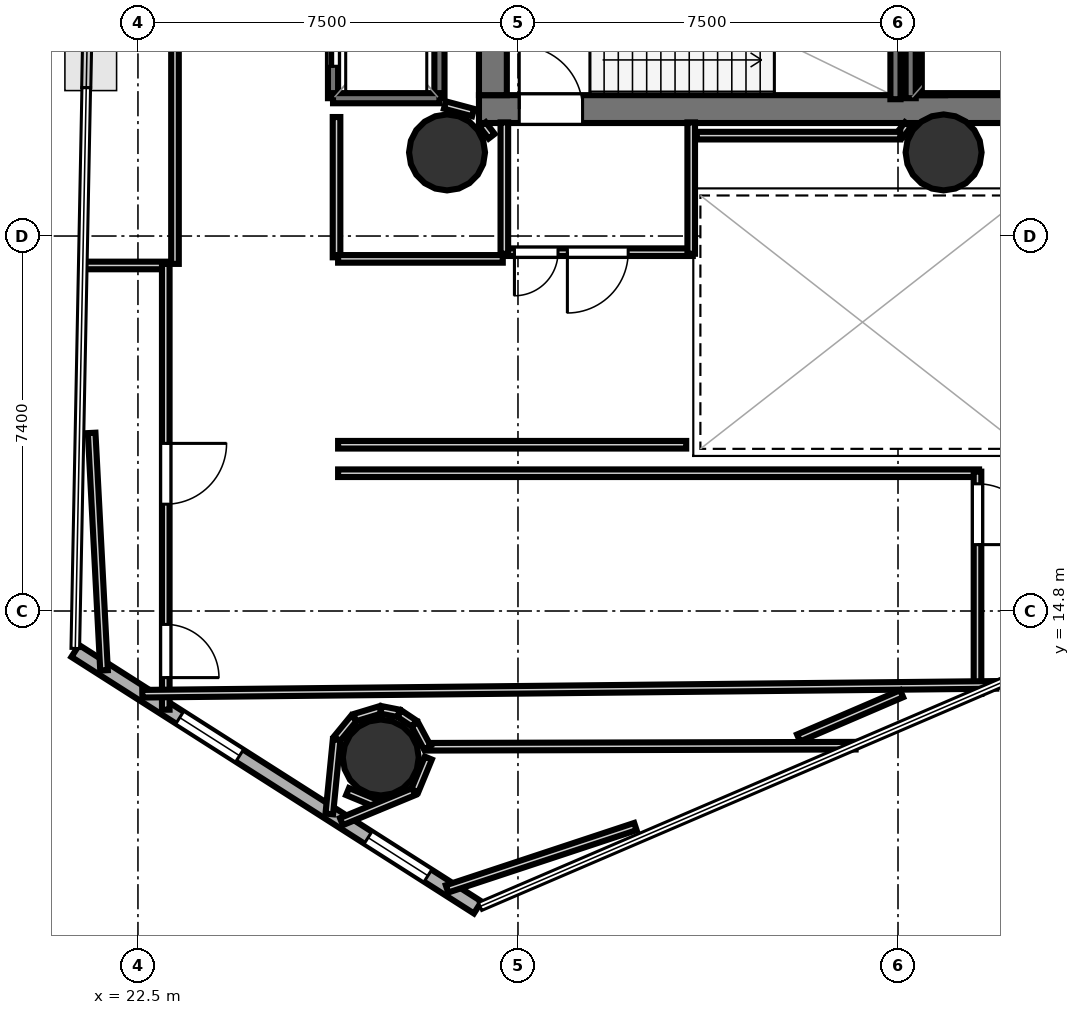
"""IFC4 building model, lengths in metres.
Left out: names, types, materials, properties, quantities, classifications, styles, units other than length and angle.
Written with IfcOpenShell. Run it as: python <this file> out.ifc"""

import sys

from ifc_helpers import new_model, si_unit, direction, frame, frame_2d, origin, origin_2d, place, context, subcontext, project, spatial, rectangle, hollow_circle, extrude, element, fill, save


model = new_model("IFC4")
c1 = context("Model", 3, precision=1e-05, world=origin(), true_north=direction((0.0, 1.0)))
c2 = subcontext(c1, "Body", "Model", "MODEL_VIEW")
j1 = project(units=[si_unit("LENGTHUNIT", "METRE"), si_unit("PLANEANGLEUNIT", "RADIAN")], contexts=[c1])
p1 = place(None, origin())
s1 = spatial("IfcSite", under=j1, at=p1, CompositionType="ELEMENT")
p2 = place(p1, origin())
s2 = spatial("IfcBuilding", under=s1, at=p2, CompositionType="ELEMENT")
p3 = place(p2, frame((0.0, 0.0, 138.5)))
s3 = spatial("IfcBuildingStorey", under=s2, at=p3, CompositionType="ELEMENT", Elevation=138.5)
p4 = place(p3, frame((29.23, 24.705, 0.0), z_axis=(0.0, 0.0, 1.0), x_axis=(1.0, 0.0, 0.0)))
e1 = element("IfcWall", 1, at=p4, inside=s3, PredefinedType="SHEAR", context=c2, shape_type="SweptSolid", body=[
    extrude(rectangle(XDim=10.62, YDim=0.55, at=frame_2d((5.31, 0.0))), origin(), (0.0, 0.0, 1.0), 4.38),
])
p5 = place(p4, frame((0.795, 0.0, 0.0)))
e2 = element("IfcOpeningElement", 2, at=p5, cuts=e1, PredefinedType="OPENING", context=c2, shape_type="SweptSolid", body=[
    extrude(rectangle(XDim=1.25, YDim=2.15, at=frame_2d((0.625, 1.075))), frame((0.0, 0.285, 0.0), z_axis=(0.0, -1.0, 0.0), x_axis=(1.0, 0.0, 0.0)), (0.0, 0.0, 1.0), 0.57),
])
p6 = place(p3, frame((29.505, 24.98, 0.0), z_axis=(0.0, 0.0, 1.0), x_axis=(0.0, 1.0, 0.0)))
e3 = element("IfcWall", 3, at=p6, inside=s3, PredefinedType="SHEAR", context=c2, shape_type="SweptSolid", body=[
    extrude(rectangle(XDim=7.44, YDim=0.55, at=frame_2d((3.72, 0.0))), origin(), (0.0, 0.0, 1.0), 4.38),
])
p7 = place(p3, frame((38.18, 24.98, 0.0), z_axis=(0.0, 0.0, 1.0), x_axis=(0.0, 1.0, 0.0)))
e4 = element("IfcWall", 4, at=p7, inside=s3, PredefinedType="SHEAR", context=c2, shape_type="SweptSolid", body=[
    extrude(rectangle(XDim=7.44, YDim=0.5, at=frame_2d((3.72, 0.0))), origin(), (0.0, 0.0, 1.0), 4.38),
])
for number, where, z_axis, x_axis in (
    (5, (28.6, 23.85, 0.0), (0.0, 0.0, 1.0), (1.0, 0.0, 0.0)),
    (6, (38.4, 23.85, 0.0), (0.0, 0.0, 1.0), (1.0, 0.0, 0.0)),
    (7, (27.292, 11.909, 0.0), (0.0, 0.0, 1.0), (1.0, 0.0, 0.0)),
):
    element("IfcColumn", number, at=place(p3, frame(where, z_axis=z_axis, x_axis=x_axis)), inside=s3, PredefinedType="COLUMN", context=c2, shape_type="SweptSolid", body=[
        extrude(hollow_circle(Radius=0.75, WallThickness=0.036, at=origin_2d()), origin(), (0.0, 0.0, 1.0), 4.6),
    ])
p8 = place(p3, frame((21.262, 14.011, 0.0), z_axis=(0.0, 0.0, 1.0), x_axis=(0.843341146408, -0.537378554442, 0.0)))
e8 = element("IfcWall", 8, at=p8, inside=s3, PredefinedType="SOLIDWALL", context=c2, shape_type="SweptSolid", body=[
    extrude(rectangle(XDim=9.419, YDim=0.28, at=frame_2d((4.709, 0.0))), origin(), (0.0, 0.0, 1.0), 4.38),
])
p9 = place(p8, frame((2.446, 0.0, 1.0)))
e9 = element("IfcOpeningElement", 9, at=p9, cuts=e8, PredefinedType="OPENING", context=c2, shape_type="SweptSolid", body=[
    extrude(rectangle(XDim=1.4, YDim=1.5, at=frame_2d((0.7, 0.75))), frame((0.0, 0.15, 0.0), z_axis=(0.0, -1.0, 0.0), x_axis=(1.0, 0.0, 0.0)), (0.0, 0.0, 1.0), 0.3),
])
p10 = place(p8, frame((6.853, 0.0, 1.0)))
e10 = element("IfcOpeningElement", 10, at=p10, cuts=e8, PredefinedType="OPENING", context=c2, shape_type="SweptSolid", body=[
    extrude(rectangle(XDim=1.4, YDim=1.5, at=frame_2d((0.7, 0.75))), frame((0.0, 0.15, 0.0), z_axis=(0.0, -1.0, 0.0), x_axis=(1.0, 0.0, 0.0)), (0.0, 0.0, 1.0), 0.3),
])
p11 = place(p3, frame((37.45, 24.9, 0.0), z_axis=(0.0, 0.0, 1.0), x_axis=(0.0, 1.0, 0.0)))
e11 = element("IfcWall", 11, at=p11, inside=s3, PredefinedType="SOLIDWALL", context=c2, shape_type="SweptSolid", body=[
    extrude(rectangle(XDim=3.06, YDim=0.2, at=frame_2d((1.53, 0.0))), origin(), (0.0, 0.0, 1.0), 4.38),
])
for number, where, z_axis, x_axis in (
    (12, (37.75, 24.92, 0.0), (0.0, 0.0, 1.0), (0.0, 1.0, 0.0)),
    (13, (28.45, 24.92, 0.0), (0.0, 0.0, 1.0), (0.0, 1.0, 0.0)),
):
    element("IfcWall", number, at=place(p3, frame(where, z_axis=z_axis, x_axis=x_axis)), inside=s3, PredefinedType="SOLIDWALL", context=c2, shape_type="SweptSolid", body=[
        extrude(rectangle(XDim=2.36, YDim=0.2, at=frame_2d((1.18, 0.0))), origin(), (0.0, 0.0, 1.0), 4.38),
    ])
p12 = place(p3, frame((26.35, 24.92, 0.0), z_axis=(0.0, 0.0, 1.0), x_axis=(0.0, 1.0, 0.0)))
e14 = element("IfcWall", 14, at=p12, inside=s3, PredefinedType="SOLIDWALL", context=c2, shape_type="SweptSolid", body=[
    extrude(rectangle(XDim=2.36, YDim=0.2, at=frame_2d((1.18, 0.0))), origin(), (0.0, 0.0, 1.0), 4.38),
])
p13 = place(p12, frame((0.63, 0.0, 0.0)))
e15 = element("IfcOpeningElement", 15, at=p13, cuts=e14, PredefinedType="OPENING", context=c2, shape_type="SweptSolid", body=[
    extrude(rectangle(XDim=1.1, YDim=2.15, at=frame_2d((0.55, 1.075))), frame((0.0, 0.11, 0.0), z_axis=(0.0, -1.0, 0.0), x_axis=(1.0, 0.0, 0.0)), (0.0, 0.0, 1.0), 0.22),
])
p14 = place(p3, frame((26.35, 24.92, 0.0), z_axis=(0.0, 0.0, 1.0), x_axis=(1.0, 0.0, 0.0)))
e16 = element("IfcWall", 16, at=p14, inside=s3, PredefinedType="SOLIDWALL", context=c2, shape_type="SweptSolid", body=[
    extrude(rectangle(XDim=2.1, YDim=0.2, at=frame_2d((1.05, 0.0))), origin(), (0.0, 0.0, 1.0), 4.38),
])
p15 = place(p3, frame((33.45, 21.881, 0.0), z_axis=(0.0, 0.0, 1.0), x_axis=(-1.0, 0.0, 0.0)))
e17 = element("IfcWall", 17, at=p15, inside=s3, PredefinedType="PARTITIONING", context=c2, shape_type="SweptSolid", body=[
    extrude(rectangle(XDim=3.75, YDim=0.15, at=frame_2d((1.875, 0.0))), origin(), (0.0, 0.0, 1.0), 2.9),
])
p16 = place(p15, frame((1.275, 0.0, 0.0)))
e18 = element("IfcOpeningElement", 18, at=p16, cuts=e17, PredefinedType="OPENING", context=c2, shape_type="SweptSolid", body=[
    extrude(rectangle(XDim=1.2, YDim=2.15, at=frame_2d((0.6, 1.075))), frame((0.0, 0.085, 0.0), z_axis=(0.0, -1.0, 0.0), x_axis=(1.0, 0.0, 0.0)), (0.0, 0.0, 1.0), 0.17),
])
p17 = place(p15, frame((2.66, 0.0, 0.0)))
e19 = element("IfcOpeningElement", 19, at=p17, cuts=e17, PredefinedType="OPENING", context=c2, shape_type="SweptSolid", body=[
    extrude(rectangle(XDim=0.86, YDim=2.05, at=frame_2d((0.43, 1.025))), frame((0.0, 0.085, 0.0), z_axis=(0.0, -1.0, 0.0), x_axis=(1.0, 0.0, 0.0)), (0.0, 0.0, 1.0), 0.17),
])
for number, where, z_axis, x_axis in (
    (20, (29.731, 21.85, 0.0), (0.0, 0.0, 1.0), (0.0, 1.0, 0.0)),
    (21, (33.419, 24.442, 0.0), (0.0, 0.0, 1.0), (0.0, -1.0, 0.0)),
):
    element("IfcWall", number, at=place(p3, frame(where, z_axis=z_axis, x_axis=x_axis)), inside=s3, PredefinedType="PARTITIONING", context=c2, shape_type="SweptSolid", body=[
        extrude(rectangle(XDim=2.592, YDim=0.15, at=frame_2d((1.296, 0.0))), origin(), (0.0, 0.0, 1.0), 2.9),
    ])
p18 = place(p3, frame((29.48, 24.169, 0.0), z_axis=(0.0, 0.0, 1.0), x_axis=(-0.608043045279, 0.79390405912, 0.0)))
e22 = element("IfcWall", 22, at=p18, inside=s3, PredefinedType="PARTITIONING", context=c2, shape_type="SweptSolid", body=[
    extrude(rectangle(XDim=0.29, YDim=0.15, at=frame_2d((0.145, 0.0))), origin(), (0.0, 0.0, 1.0), 2.9),
])
p19 = place(p3, frame((29.114, 24.637, 0.0), z_axis=(0.0, 0.0, 1.0), x_axis=(-0.966199685486, 0.257794817183, 0.0)))
e23 = element("IfcWall", 23, at=p19, inside=s3, PredefinedType="PARTITIONING", context=c2, shape_type="SweptSolid", body=[
    extrude(rectangle(XDim=0.575, YDim=0.15, at=frame_2d((0.288, 0.0))), origin(), (0.0, 0.0, 1.0), 2.9),
])
p20 = place(p3, frame((37.697, 24.399, 0.0), z_axis=(0.0, 0.0, 1.0), x_axis=(-0.60763139403, -0.794219169367, 0.0)))
e24 = element("IfcWall", 24, at=p20, inside=s3, PredefinedType="PARTITIONING", context=c2, shape_type="SweptSolid", body=[
    extrude(rectangle(XDim=0.25, YDim=0.15, at=frame_2d((0.125, 0.0))), origin(), (0.0, 0.0, 1.0), 2.9),
])
p21 = place(p3, frame((37.545, 24.181, 0.0), z_axis=(0.0, 0.0, 1.0), x_axis=(-1.0, 0.0, 0.0)))
e25 = element("IfcWall", 25, at=p21, inside=s3, PredefinedType="PARTITIONING", context=c2, shape_type="SweptSolid", body=[
    extrude(rectangle(XDim=4.015, YDim=0.15, at=frame_2d((2.007, 0.0))), origin(), (0.0, 0.0, 1.0), 2.9),
])
p22 = place(p3, frame((21.831, 13.628, 0.0), z_axis=(0.0, 0.0, 1.0), x_axis=(-0.052078231373, 0.998643008195, 0.0)))
e26 = element("IfcWall", 26, at=p22, inside=s3, PredefinedType="PARTITIONING", context=c2, shape_type="SweptSolid", body=[
    extrude(rectangle(XDim=4.693, YDim=0.15, at=frame_2d((2.346, 0.0))), origin(), (0.0, 0.0, 1.0), 2.9),
])
p23 = place(p3, frame((21.391, 21.619, 0.0), z_axis=(0.0, 0.0, 1.0), x_axis=(1.0, 0.0, 0.0)))
e27 = element("IfcWall", 27, at=p23, inside=s3, PredefinedType="PARTITIONING", context=c2, shape_type="SweptSolid", body=[
    extrude(rectangle(XDim=1.689, YDim=0.15, at=frame_2d((0.845, 0.0))), origin(), (0.0, 0.0, 1.0), 2.9),
])
p24 = place(p3, frame((23.049, 21.65, 0.0), z_axis=(0.0, 0.0, 1.0), x_axis=(0.0, -1.0, 0.0)))
e28 = element("IfcWall", 28, at=p24, inside=s3, PredefinedType="PARTITIONING", context=c2, shape_type="SweptSolid", body=[
    extrude(rectangle(XDim=8.797, YDim=0.15, at=frame_2d((4.399, 0.0))), origin(), (0.0, 0.0, 1.0), 2.9),
])
p25 = place(p24, frame((3.542, 0.0, 0.0)))
e29 = element("IfcOpeningElement", 29, at=p25, cuts=e28, PredefinedType="OPENING", context=c2, shape_type="SweptSolid", body=[
    extrude(rectangle(XDim=1.2, YDim=2.15, at=frame_2d((0.6, 1.075))), frame((0.0, 0.085, 0.0), z_axis=(0.0, -1.0, 0.0), x_axis=(1.0, 0.0, 0.0)), (0.0, 0.0, 1.0), 0.17),
])
p26 = place(p24, frame((7.114, 0.0, 0.0)))
e30 = element("IfcOpeningElement", 30, at=p26, cuts=e28, PredefinedType="OPENING", context=c2, shape_type="SweptSolid", body=[
    extrude(rectangle(XDim=1.05, YDim=2.15, at=frame_2d((0.525, 1.075))), frame((0.0, 0.085, 0.0), z_axis=(0.0, -1.0, 0.0), x_axis=(1.0, 0.0, 0.0)), (0.0, 0.0, 1.0), 0.17),
])
p27 = place(p3, frame((26.419, 24.548, 0.0), z_axis=(0.0, 0.0, 1.0), x_axis=(0.0, -1.0, 0.0)))
e31 = element("IfcWall", 31, at=p27, inside=s3, PredefinedType="PARTITIONING", context=c2, shape_type="SweptSolid", body=[
    extrude(rectangle(XDim=2.768, YDim=0.15, at=frame_2d((1.384, 0.0))), origin(), (0.0, 0.0, 1.0), 2.9),
])
p28 = place(p3, frame((26.45, 21.749, 0.0), z_axis=(0.0, 0.0, 1.0), x_axis=(1.0, 0.0, 0.0)))
e32 = element("IfcWall", 32, at=p28, inside=s3, PredefinedType="PARTITIONING", context=c2, shape_type="SweptSolid", body=[
    extrude(rectangle(XDim=3.25, YDim=0.15, at=frame_2d((1.625, 0.0))), origin(), (0.0, 0.0, 1.0), 2.9),
])
p29 = place(p3, frame((33.32, 18.081, 0.0), z_axis=(0.0, 0.0, 1.0), x_axis=(-1.0, 0.0, 0.0)))
e33 = element("IfcWall", 33, at=p29, inside=s3, PredefinedType="PARTITIONING", context=c2, shape_type="SweptSolid", body=[
    extrude(rectangle(XDim=6.87, YDim=0.15, at=frame_2d((3.435, 0.0))), origin(), (0.0, 0.0, 1.0), 2.9),
])
p30 = place(p3, frame((26.45, 17.519, 0.0), z_axis=(0.0, 0.0, 1.0), x_axis=(1.0, 0.0, 0.0)))
e34 = element("IfcWall", 34, at=p30, inside=s3, PredefinedType="PARTITIONING", context=c2, shape_type="SweptSolid", body=[
    extrude(rectangle(XDim=12.65, YDim=0.15, at=frame_2d((6.325, 0.0))), origin(), (0.0, 0.0, 1.0), 2.9),
])
p31 = place(p3, frame((39.069, 17.55, 0.0), z_axis=(0.0, 0.0, 1.0), x_axis=(0.0, -1.0, 0.0)))
e35 = element("IfcWall", 35, at=p31, inside=s3, PredefinedType="PARTITIONING", context=c2, shape_type="SweptSolid", body=[
    extrude(rectangle(XDim=4.386, YDim=0.15, at=frame_2d((2.193, 0.0))), origin(), (0.0, 0.0, 1.0), 2.9),
])
p32 = place(p31, frame((0.24, 0.0, 0.0)))
e36 = element("IfcOpeningElement", 36, at=p32, cuts=e35, PredefinedType="OPENING", context=c2, shape_type="SweptSolid", body=[
    extrude(rectangle(XDim=1.2, YDim=2.15, at=frame_2d((0.6, 1.075))), frame((0.0, 0.085, 0.0), z_axis=(0.0, -1.0, 0.0), x_axis=(1.0, 0.0, 0.0)), (0.0, 0.0, 1.0), 0.17),
])
p33 = place(p3, frame((39.439, 13.342, 0.0), z_axis=(0.0, 0.0, 1.0), x_axis=(-0.999946210458, -0.010371894228, 0.0)))
e37 = element("IfcWall", 37, at=p33, inside=s3, PredefinedType="PARTITIONING", context=c2, shape_type="SweptSolid", body=[
    extrude(rectangle(XDim=16.854, YDim=0.15, at=frame_2d((8.427, 0.0))), origin(), (0.0, 0.0, 1.0), 2.9),
])
p34 = place(p3, frame((23.231, 21.65, 0.0), z_axis=(0.0, 0.0, 1.0), x_axis=(0.0, 1.0, 0.0)))
e38 = element("IfcWall", 38, at=p34, inside=s3, PredefinedType="PARTITIONING", context=c2, shape_type="SweptSolid", body=[
    extrude(rectangle(XDim=4.882, YDim=0.15, at=frame_2d((2.441, 0.0))), origin(), (0.0, 0.0, 1.0), 2.9),
])
p35 = place(p3, frame((37.572, 13.168, 0.0), z_axis=(0.0, 0.0, 1.0), x_axis=(-0.918911067861, -0.394464763144, 0.0)))
e39 = element("IfcWall", 39, at=p35, inside=s3, PredefinedType="PARTITIONING", context=c2, shape_type="SweptSolid", body=[
    extrude(rectangle(XDim=2.215, YDim=0.15, at=frame_2d((1.107, 0.0))), origin(), (0.0, 0.0, 1.0), 2.9),
])
p36 = place(p3, frame((36.663, 12.142, 0.0), z_axis=(0.0, 0.0, 1.0), x_axis=(-0.999996934648, -0.00247602385, 0.0)))
e40 = element("IfcWall", 40, at=p36, inside=s3, PredefinedType="PARTITIONING", context=c2, shape_type="SweptSolid", body=[
    extrude(rectangle(XDim=8.48, YDim=0.15, at=frame_2d((4.24, 0.0))), origin(), (0.0, 0.0, 1.0), 2.9),
])
p37 = place(p3, frame((28.211, 12.104, 0.0), z_axis=(0.0, 0.0, 1.0), x_axis=(-0.472156867062, 0.881514544909, 0.0)))
e41 = element("IfcWall", 41, at=p37, inside=s3, PredefinedType="PARTITIONING", context=c2, shape_type="SweptSolid", body=[
    extrude(rectangle(XDim=0.525, YDim=0.15, at=frame_2d((0.262, 0.0))), origin(), (0.0, 0.0, 1.0), 2.9),
])
for number, where, z_axis, x_axis in (
    (42, (27.953, 12.578, 0.0), (0.0, 0.0, 1.0), (-0.831, 0.556, 0.0)),
    (43, (27.646, 12.78, 0.0), (0.0, 0.0, 1.0), (-0.981, 0.195, 0.0)),
):
    element("IfcWall", number, at=place(p3, frame(where, z_axis=z_axis, x_axis=x_axis)), inside=s3, PredefinedType="PARTITIONING", context=c2, shape_type="SweptSolid", body=[
        extrude(rectangle(XDim=0.355, YDim=0.15, at=frame_2d((0.177, 0.0))), origin(), (0.0, 0.0, 1.0), 2.9),
    ])
for number, where, z_axis, x_axis in (
    (44, (27.283, 12.849, 0.0), (0.0, 0.0, 1.0), (-0.957, -0.29, 0.0)),
    (45, (26.762, 12.685, 0.0), (0.0, 0.0, 1.0), (-0.634, -0.773, 0.0)),
):
    element("IfcWall", number, at=place(p3, frame(where, z_axis=z_axis, x_axis=x_axis)), inside=s3, PredefinedType="PARTITIONING", context=c2, shape_type="SweptSolid", body=[
        extrude(rectangle(XDim=0.528, YDim=0.15, at=frame_2d((0.264, 0.0))), origin(), (0.0, 0.0, 1.0), 2.9),
    ])
p38 = place(p3, frame((26.42, 12.26, 0.0), z_axis=(0.0, 0.0, 1.0), x_axis=(-0.098157475799, -0.995170894844, 0.0)))
e46 = element("IfcWall", 46, at=p38, inside=s3, PredefinedType="PARTITIONING", context=c2, shape_type="SweptSolid", body=[
    extrude(rectangle(XDim=1.472, YDim=0.15, at=frame_2d((0.736, 0.0))), origin(), (0.0, 0.0, 1.0), 2.9),
])
p39 = place(p3, frame((26.637, 11.237, 0.0), z_axis=(0.0, 0.0, 1.0), x_axis=(0.923935648299, -0.382547928764, 0.0)))
e47 = element("IfcWall", 47, at=p39, inside=s3, PredefinedType="PARTITIONING", context=c2, shape_type="SweptSolid", body=[
    extrude(rectangle(XDim=0.696, YDim=0.15, at=frame_2d((0.348, 0.0))), origin(), (0.0, 0.0, 1.0), 2.9),
])
p40 = place(p3, frame((26.516, 10.644, 0.0), z_axis=(0.0, 0.0, 1.0), x_axis=(0.923909287475, 0.382611589628, 0.0)))
e48 = element("IfcWall", 48, at=p40, inside=s3, PredefinedType="PARTITIONING", context=c2, shape_type="SweptSolid", body=[
    extrude(rectangle(XDim=1.549, YDim=0.15, at=frame_2d((0.775, 0.0))), origin(), (0.0, 0.0, 1.0), 2.9),
])
p41 = place(p3, frame((27.964, 11.254, 0.0), z_axis=(0.0, 0.0, 1.0), x_axis=(0.381929177829, 0.92419159438, 0.0)))
e49 = element("IfcWall", 49, at=p41, inside=s3, PredefinedType="PARTITIONING", context=c2, shape_type="SweptSolid", body=[
    extrude(rectangle(XDim=0.698, YDim=0.15, at=frame_2d((0.349, 0.0))), origin(), (0.0, 0.0, 1.0), 2.9),
])
p42 = place(p3, frame((32.317, 10.546, 0.0), z_axis=(0.0, 0.0, 1.0), x_axis=(-0.949354448722, -0.314207146149, 0.0)))
e50 = element("IfcWall", 50, at=p42, inside=s3, PredefinedType="PARTITIONING", context=c2, shape_type="SweptSolid", body=[
    extrude(rectangle(XDim=3.916, YDim=0.15, at=frame_2d((1.958, 0.0))), origin(), (0.0, 0.0, 1.0), 2.9),
])
p43 = place(p5, origin())
e51 = element("IfcDoor", 51, at=p43, inside=s3, OperationType="SINGLE_SWING_LEFT", PredefinedType="DOOR", context=c2, shape_type="SweptSolid", body=[
    extrude(rectangle(XDim=1.25, YDim=2.15, at=frame_2d((0.625, 1.075))), frame((0.0, 0.025, 0.0), z_axis=(0.0, -1.0, 0.0), x_axis=(1.0, 0.0, 0.0)), (0.0, 0.0, 1.0), 0.05),
])
fill(e2, e51)
p44 = place(p13, origin())
e52 = element("IfcDoor", 52, at=p44, inside=s3, OperationType="SLIDING_TO_LEFT", PredefinedType="DOOR", context=c2, shape_type="SweptSolid", body=[
    extrude(rectangle(XDim=1.1, YDim=2.15, at=frame_2d((0.55, 1.075))), frame((0.0, 0.025, 0.0), z_axis=(0.0, -1.0, 0.0), x_axis=(1.0, 0.0, 0.0)), (0.0, 0.0, 1.0), 0.05),
])
fill(e15, e52)
p45 = place(p16, origin())
e53 = element("IfcDoor", 53, at=p45, inside=s3, OperationType="SINGLE_SWING_RIGHT", PredefinedType="DOOR", context=c2, shape_type="SweptSolid", body=[
    extrude(rectangle(XDim=1.2, YDim=2.15, at=frame_2d((0.6, 1.075))), frame((0.0, 0.025, 0.0), z_axis=(0.0, -1.0, 0.0), x_axis=(1.0, 0.0, 0.0)), (0.0, 0.0, 1.0), 0.05),
])
fill(e18, e53)
p46 = place(p25, origin())
e54 = element("IfcDoor", 54, at=p46, inside=s3, OperationType="SINGLE_SWING_LEFT", PredefinedType="DOOR", context=c2, shape_type="SweptSolid", body=[
    extrude(rectangle(XDim=1.2, YDim=2.15, at=frame_2d((0.6, 1.075))), frame((0.0, 0.025, 0.0), z_axis=(0.0, -1.0, 0.0), x_axis=(1.0, 0.0, 0.0)), (0.0, 0.0, 1.0), 0.05),
])
fill(e29, e54)
p47 = place(p32, origin())
e55 = element("IfcDoor", 55, at=p47, inside=s3, OperationType="SINGLE_SWING_RIGHT", PredefinedType="DOOR", context=c2, shape_type="SweptSolid", body=[
    extrude(rectangle(XDim=1.2, YDim=2.15, at=frame_2d((0.6, 1.075))), frame((0.0, 0.025, 0.0), z_axis=(0.0, -1.0, 0.0), x_axis=(1.0, 0.0, 0.0)), (0.0, 0.0, 1.0), 0.05),
])
fill(e36, e55)
p48 = place(p17, origin())
e56 = element("IfcDoor", 56, at=p48, inside=s3, OperationType="SINGLE_SWING_RIGHT", PredefinedType="DOOR", context=c2, shape_type="SweptSolid", body=[
    extrude(rectangle(XDim=0.86, YDim=2.05, at=frame_2d((0.43, 1.025))), frame((0.0, 0.025, 0.0), z_axis=(0.0, -1.0, 0.0), x_axis=(1.0, 0.0, 0.0)), (0.0, 0.0, 1.0), 0.05),
])
fill(e19, e56)
p49 = place(p26, origin())
e57 = element("IfcDoor", 57, at=p49, inside=s3, OperationType="SINGLE_SWING_RIGHT", PredefinedType="DOOR", context=c2, shape_type="SweptSolid", body=[
    extrude(rectangle(XDim=1.05, YDim=2.15, at=frame_2d((0.525, 1.075))), frame((0.0, 0.025, 0.0), z_axis=(0.0, -1.0, 0.0), x_axis=(1.0, 0.0, 0.0)), (0.0, 0.0, 1.0), 0.05),
])
fill(e30, e57)
p50 = place(p9, origin())
e58 = element("IfcWindow", 58, at=p50, inside=s3, PartitioningType="SINGLE_PANEL", PredefinedType="WINDOW", context=c2, shape_type="SweptSolid", body=[
    extrude(rectangle(XDim=1.4, YDim=1.5, at=frame_2d((0.7, 0.75))), frame((0.0, 0.03, 0.0), z_axis=(0.0, -1.0, 0.0), x_axis=(1.0, 0.0, 0.0)), (0.0, 0.0, 1.0), 0.06),
])
fill(e9, e58)
p51 = place(p10, origin())
e59 = element("IfcWindow", 59, at=p51, inside=s3, PartitioningType="SINGLE_PANEL", PredefinedType="WINDOW", context=c2, shape_type="SweptSolid", body=[
    extrude(rectangle(XDim=1.4, YDim=1.5, at=frame_2d((0.7, 0.75))), frame((0.0, 0.03, 0.0), z_axis=(0.0, -1.0, 0.0), x_axis=(1.0, 0.0, 0.0)), (0.0, 0.0, 1.0), 0.06),
])
fill(e10, e59)
save(model, sys.argv[1])
